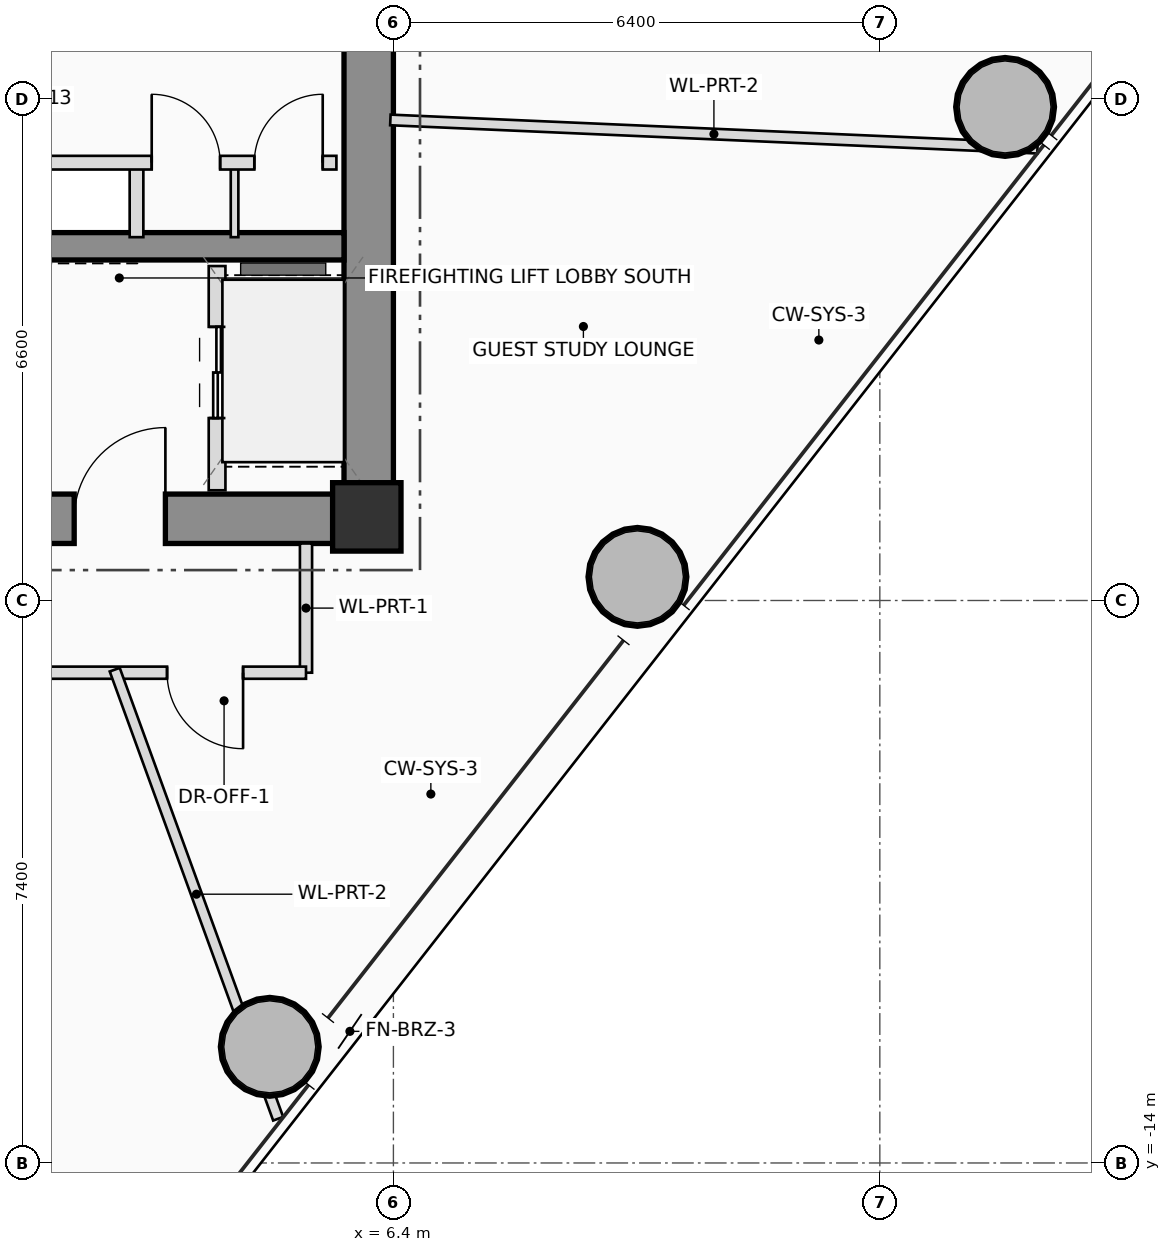
"""IFC4 building model, lengths in metres.
Left out: names, types, materials, properties, quantities, classifications, styles, units other than length and angle.
Written with IfcOpenShell. Run it as: python <this file> out.ifc"""

import sys

from ifc_helpers import new_model, si_unit, direction, frame, frame_2d, origin, origin_2d, place, context, subcontext, project, spatial, rectangle, hollow_circle, extrude, source, transform, mapped, element, fill, save


model = new_model("IFC4")
c1 = context("Model", 3, precision=1e-05, world=origin(), true_north=direction((0.0, 1.0)))
c2 = subcontext(c1, "Body", "Model", "MODEL_VIEW")
j1 = project(units=[si_unit("LENGTHUNIT", "METRE"), si_unit("PLANEANGLEUNIT", "RADIAN")], contexts=[c1])
p1 = place(None, origin())
s1 = spatial("IfcSite", under=j1, at=p1, CompositionType="ELEMENT")
p2 = place(p1, origin())
s2 = spatial("IfcBuilding", under=s1, at=p2, CompositionType="ELEMENT")
p3 = place(p2, frame((0.0, 0.0, 129.5)))
s3 = spatial("IfcBuildingStorey", under=s2, at=p3, CompositionType="ELEMENT", Elevation=129.5)
m1 = source(origin(), c2, "Body", "SweptSolid", [
    extrude(rectangle(XDim=0.9, YDim=0.9, at=origin_2d()), origin(), (0.0, 0.0, 1.0), 3.45),
])
p4 = place(p3, frame((6.05, -5.5, 0.0), z_axis=(0.0, 0.0, 1.0), x_axis=(1.0, 0.0, 0.0)))
e1 = element("IfcColumn", 1, at=p4, inside=s3, PredefinedType="COLUMN", context=c2, shape_type="MappedRepresentation", body=[
    mapped(m1, transform((0.0, 0.0, 0.0), scale=1.0)),
])
p5 = place(p3, frame((-6.4, -5.525, 0.0), z_axis=(0.0, 0.0, 1.0), x_axis=(1.0, 0.0, 0.0)))
e2 = element("IfcWall", 2, at=p5, inside=s3, PredefinedType="SHEAR", context=c2, shape_type="SweptSolid", body=[
    extrude(rectangle(XDim=12.8, YDim=0.65, at=frame_2d((6.4, 0.0))), origin(), (0.0, 0.0, 1.0), 3.45),
])
p6 = place(p5, frame((8.6, 0.0, 0.0)))
e3 = element("IfcOpeningElement", 3, at=p6, cuts=e2, PredefinedType="OPENING", context=c2, shape_type="SweptSolid", body=[
    extrude(rectangle(XDim=1.2, YDim=2.2, at=frame_2d((0.6, 1.1))), frame((0.0, 0.335, 0.0), z_axis=(0.0, -1.0, 0.0), x_axis=(1.0, 0.0, 0.0)), (0.0, 0.0, 1.0), 0.67),
])
p7 = place(p3, frame((6.075, -5.2, 0.0), z_axis=(0.0, 0.0, 1.0), x_axis=(0.0, 1.0, 0.0)))
e4 = element("IfcWall", 4, at=p7, inside=s3, PredefinedType="SHEAR", context=c2, shape_type="SweptSolid", body=[
    extrude(rectangle(XDim=10.4, YDim=0.65, at=frame_2d((5.2, 0.0))), origin(), (0.0, 0.0, 1.0), 3.45),
])
p8 = place(p3, frame((-5.75, -1.94, 0.0), z_axis=(0.0, 0.0, 1.0), x_axis=(1.0, 0.0, 0.0)))
e5 = element("IfcWall", 5, at=p8, inside=s3, PredefinedType="SHEAR", context=c2, shape_type="SweptSolid", body=[
    extrude(rectangle(XDim=11.5, YDim=0.36, at=frame_2d((5.75, 0.0))), origin(), (0.0, 0.0, 1.0), 3.45),
])
m2 = source(origin(), c2, "Body", "SweptSolid", [
    extrude(hollow_circle(Radius=0.65, WallThickness=0.045, at=origin_2d()), origin(), (0.0, 0.0, 1.0), 3.45),
])
for number, where, z_axis, x_axis in (
    (6, (4.773, -12.472, 0.0), (0.0, 0.0, 1.0), (1.0, 0.0, 0.0)),
    (7, (9.611, -6.289, 0.0), (0.0, 0.0, 1.0), (1.0, 0.0, 0.0)),
    (8, (14.448, -0.107, 0.0), (0.0, 0.0, 1.0), (1.0, 0.0, 0.0)),
):
    element("IfcColumn", number, at=place(p3, frame(where, z_axis=z_axis, x_axis=x_axis)), inside=s3, PredefinedType="COLUMN", context=c2, shape_type="MappedRepresentation", body=[
        mapped(m2, transform((0.0, 0.0, 0.0), scale=1.0)),
    ])
p9 = place(p3, frame((4.08, -5.15, 0.0), z_axis=(0.0, 0.0, 1.0), x_axis=(0.0, 1.0, 0.0)))
e9 = element("IfcWall", 9, at=p9, inside=s3, PredefinedType="PLUMBINGWALL", context=c2, shape_type="SweptSolid", body=[
    extrude(rectangle(XDim=2.95, YDim=0.22, at=frame_2d((1.475, 0.0))), origin(), (0.0, 0.0, 1.0), 3.25),
])
p10 = place(p9, frame((0.95, 0.0, 0.0)))
e10 = element("IfcOpeningElement", 10, at=p10, cuts=e9, PredefinedType="OPENING", context=c2, shape_type="SweptSolid", body=[
    extrude(rectangle(XDim=1.2, YDim=2.25, at=frame_2d((0.6, 1.125))), frame((0.0, 0.12, 0.0), z_axis=(0.0, -1.0, 0.0), x_axis=(1.0, 0.0, 0.0)), (0.0, 0.0, 1.0), 0.24),
])
p11 = place(p3, frame((3.02, -1.82, 0.0), z_axis=(0.0, 0.0, 1.0), x_axis=(0.0, 1.0, 0.0)))
e11 = element("IfcWall", 11, at=p11, inside=s3, PredefinedType="PLUMBINGWALL", context=c2, shape_type="SweptSolid", body=[
    extrude(rectangle(XDim=0.98, YDim=0.18, at=frame_2d((0.49, 0.0))), origin(), (0.0, 0.0, 1.0), 3.25),
])
p12 = place(p3, frame((4.31, -1.82, 0.0), z_axis=(0.0, 0.0, 1.0), x_axis=(0.0, 1.0, 0.0)))
e12 = element("IfcWall", 12, at=p12, inside=s3, PredefinedType="PARTITIONING", context=c2, shape_type="SweptSolid", body=[
    extrude(rectangle(XDim=0.98, YDim=0.1, at=frame_2d((0.49, 0.0))), origin(), (0.0, 0.0, 1.0), 3.25),
])
p13 = place(p3, frame((-5.68, -0.84, 0.0), z_axis=(0.0, 0.0, 1.0), x_axis=(1.0, 0.0, 0.0)))
e13 = element("IfcWall", 13, at=p13, inside=s3, PredefinedType="PLUMBINGWALL", context=c2, shape_type="SweptSolid", body=[
    extrude(rectangle(XDim=11.33, YDim=0.18, at=frame_2d((5.665, 0.0))), origin(), (0.0, 0.0, 1.0), 3.25),
])
p14 = place(p13, frame((1.18, 0.0, 0.0)))
e14 = element("IfcOpeningElement", 14, at=p14, cuts=e13, PredefinedType="OPENING", context=c2, shape_type="SweptSolid", body=[
    extrude(rectangle(XDim=0.9, YDim=2.05, at=frame_2d((0.45, 1.025))), frame((0.0, 0.1, 0.0), z_axis=(0.0, -1.0, 0.0), x_axis=(1.0, 0.0, 0.0)), (0.0, 0.0, 1.0), 0.2),
])
p15 = place(p13, frame((3.93, 0.0, 0.0)))
e15 = element("IfcOpeningElement", 15, at=p15, cuts=e13, PredefinedType="OPENING", context=c2, shape_type="SweptSolid", body=[
    extrude(rectangle(XDim=1.1, YDim=2.2, at=frame_2d((0.55, 1.1))), frame((0.0, 0.1, 0.0), z_axis=(0.0, -1.0, 0.0), x_axis=(1.0, 0.0, 0.0)), (0.0, 0.0, 1.0), 0.2),
])
p16 = place(p13, frame((5.63, 0.0, 0.0)))
e16 = element("IfcOpeningElement", 16, at=p16, cuts=e13, PredefinedType="OPENING", context=c2, shape_type="SweptSolid", body=[
    extrude(rectangle(XDim=1.1, YDim=2.2, at=frame_2d((0.55, 1.1))), frame((0.0, 0.1, 0.0), z_axis=(0.0, -1.0, 0.0), x_axis=(1.0, 0.0, 0.0)), (0.0, 0.0, 1.0), 0.2),
])
p17 = place(p13, frame((8.9, 0.0, 0.0)))
e17 = element("IfcOpeningElement", 17, at=p17, cuts=e13, PredefinedType="OPENING", context=c2, shape_type="SweptSolid", body=[
    extrude(rectangle(XDim=0.9, YDim=2.05, at=frame_2d((0.45, 1.025))), frame((0.0, 0.1, 0.0), z_axis=(0.0, -1.0, 0.0), x_axis=(1.0, 0.0, 0.0)), (0.0, 0.0, 1.0), 0.2),
])
p18 = place(p13, frame((10.25, 0.0, 0.0)))
e18 = element("IfcOpeningElement", 18, at=p18, cuts=e13, PredefinedType="OPENING", context=c2, shape_type="SweptSolid", body=[
    extrude(rectangle(XDim=0.9, YDim=2.05, at=frame_2d((0.45, 1.025))), frame((0.0, 0.1, 0.0), z_axis=(0.0, -1.0, 0.0), x_axis=(1.0, 0.0, 0.0)), (0.0, 0.0, 1.0), 0.2),
])
p19 = place(p3, frame((5.25, -5.85, 0.0), z_axis=(0.0, 0.0, 1.0), x_axis=(0.0, -1.0, 0.0)))
e19 = element("IfcWall", 19, at=p19, inside=s3, PredefinedType="PARTITIONING", context=c2, shape_type="SweptSolid", body=[
    extrude(rectangle(XDim=1.7, YDim=0.16, at=frame_2d((0.85, 0.0))), origin(), (0.0, 0.0, 1.0), 3.25),
])
p20 = place(p3, frame((5.25, -7.55, 0.0), z_axis=(0.0, 0.0, 1.0), x_axis=(-1.0, 0.0, 0.0)))
e20 = element("IfcWall", 20, at=p20, inside=s3, PredefinedType="PARTITIONING", context=c2, shape_type="SweptSolid", body=[
    extrude(rectangle(XDim=11.61, YDim=0.16, at=frame_2d((5.805, 0.0))), origin(), (0.0, 0.0, 1.0), 2.605),
])
p21 = place(p20, frame((0.828, 0.0, 0.0)))
e21 = element("IfcOpeningElement", 21, at=p21, cuts=e20, PredefinedType="OPENING", context=c2, shape_type="SweptSolid", body=[
    extrude(rectangle(XDim=1.0, YDim=2.25, at=frame_2d((0.5, 1.125))), frame((0.0, 0.09, 0.0), z_axis=(0.0, -1.0, 0.0), x_axis=(1.0, 0.0, 0.0)), (0.0, 0.0, 1.0), 0.18),
])
p22 = place(p3, frame((6.36, -0.278, 0.0), z_axis=(0.0, 0.0, 1.0), x_axis=(0.999047707238, -0.043631166178, 0.0)))
e22 = element("IfcWall", 22, at=p22, inside=s3, PredefinedType="PARTITIONING", context=c2, shape_type="SweptSolid", body=[
    extrude(rectangle(XDim=8.522, YDim=0.14, at=frame_2d((4.261, 0.0))), origin(), (0.0, 0.0, 1.0), 2.605),
])
p23 = place(p3, frame((2.733, -7.51, 0.0), z_axis=(0.0, 0.0, 1.0), x_axis=(0.342029891784, -0.93968907258, 0.0)))
e23 = element("IfcWall", 23, at=p23, inside=s3, PredefinedType="PARTITIONING", context=c2, shape_type="SweptSolid", body=[
    extrude(rectangle(XDim=6.287, YDim=0.14, at=frame_2d((3.144, 0.0))), origin(), (0.0, 0.0, 1.0), 2.805),
])
p24 = place(p6, origin())
e24 = element("IfcDoor", 24, at=p24, inside=s3, OperationType="SINGLE_SWING_RIGHT", PredefinedType="DOOR", context=c2, shape_type="SweptSolid", body=[
    extrude(rectangle(XDim=1.2, YDim=2.2, at=frame_2d((0.6, 1.1))), frame((0.0, 0.025, 0.0), z_axis=(0.0, -1.0, 0.0), x_axis=(1.0, 0.0, 0.0)), (0.0, 0.0, 1.0), 0.05),
])
fill(e3, e24)
p25 = place(p10, origin())
e25 = element("IfcDoor", 25, at=p25, inside=s3, OperationType="DOUBLE_DOOR_SLIDING", PredefinedType="DOOR", context=c2, shape_type="SweptSolid", body=[
    extrude(rectangle(XDim=1.2, YDim=2.25, at=frame_2d((0.6, 1.125))), frame((0.0, 0.025, 0.0), z_axis=(0.0, -1.0, 0.0), x_axis=(1.0, 0.0, 0.0)), (0.0, 0.0, 1.0), 0.05),
])
fill(e10, e25)
p26 = place(p17, origin())
e26 = element("IfcDoor", 26, at=p26, inside=s3, OperationType="SINGLE_SWING_LEFT", PredefinedType="DOOR", context=c2, shape_type="SweptSolid", body=[
    extrude(rectangle(XDim=0.9, YDim=2.05, at=frame_2d((0.45, 1.025))), frame((0.0, 0.025, 0.0), z_axis=(0.0, -1.0, 0.0), x_axis=(1.0, 0.0, 0.0)), (0.0, 0.0, 1.0), 0.05),
])
fill(e17, e26)
p27 = place(p18, origin())
e27 = element("IfcDoor", 27, at=p27, inside=s3, OperationType="SINGLE_SWING_RIGHT", PredefinedType="DOOR", context=c2, shape_type="SweptSolid", body=[
    extrude(rectangle(XDim=0.9, YDim=2.05, at=frame_2d((0.45, 1.025))), frame((0.0, 0.025, 0.0), z_axis=(0.0, -1.0, 0.0), x_axis=(1.0, 0.0, 0.0)), (0.0, 0.0, 1.0), 0.05),
])
fill(e18, e27)
p28 = place(p21, origin())
e28 = element("IfcDoor", 28, at=p28, inside=s3, OperationType="SINGLE_SWING_LEFT", PredefinedType="DOOR", context=c2, shape_type="SweptSolid", body=[
    extrude(rectangle(XDim=1.0, YDim=2.25, at=frame_2d((0.5, 1.125))), frame((0.0, 0.025, 0.0), z_axis=(0.0, -1.0, 0.0), x_axis=(1.0, 0.0, 0.0)), (0.0, 0.0, 1.0), 0.05),
])
fill(e21, e28)
save(model, sys.argv[1])
